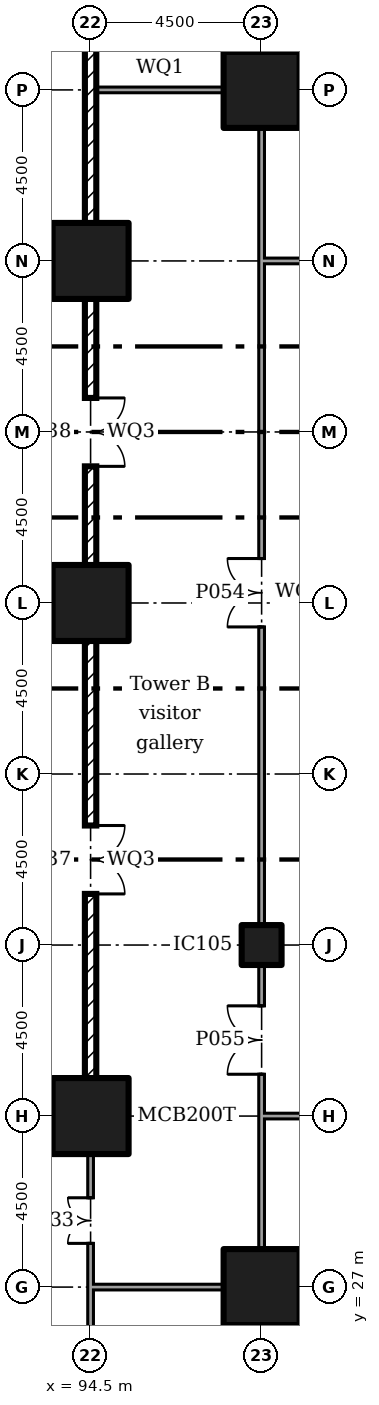
"""IFC4 building model, lengths in metres.
Left out: names, types, materials, properties, quantities, classifications, styles, units other than length and angle.
Written with IfcOpenShell. Run it as: python <this file> out.ifc"""

import sys

from ifc_helpers import new_model, si_unit, direction, frame, frame_2d, origin, origin_2d, place, context, subcontext, project, spatial, rectangle, extrude, element, fill, save


model = new_model("IFC4")
c1 = context("Model", 3, precision=1e-05, world=origin(), true_north=direction((0.0, 1.0)))
c2 = subcontext(c1, "Body", "Model", "MODEL_VIEW")
j1 = project(units=[si_unit("LENGTHUNIT", "METRE"), si_unit("PLANEANGLEUNIT", "RADIAN")], contexts=[c1])
p1 = place(None, origin())
s1 = spatial("IfcSite", under=j1, at=p1, CompositionType="ELEMENT")
p2 = place(p1, origin())
s2 = spatial("IfcBuilding", under=s1, at=p2, CompositionType="ELEMENT")
p3 = place(p2, frame((0.0, 0.0, 6.0)))
s3 = spatial("IfcBuildingStorey", under=s2, at=p3, CompositionType="ELEMENT", Elevation=6.0)
for number, where in (
    (1, (94.5, 31.5, 0.0)),
    (2, (94.5, 45.0, 0.0)),
    (3, (94.5, 54.0, 0.0)),
    (4, (99.0, 27.0, 0.0)),
    (5, (99.0, 58.5, 0.0)),
):
    element("IfcColumn", number, at=place(p3, frame(where)), inside=s3, PredefinedType="COLUMN", context=c2, shape_type="SweptSolid", body=[
        extrude(rectangle(XDim=2.0, YDim=2.0, at=origin_2d()), origin(), (0.0, 0.0, 1.0), 5.5),
    ])
p4 = place(p3, frame((99.0, 36.0, 0.0)))
e6 = element("IfcColumn", 6, at=p4, inside=s3, PredefinedType="COLUMN", context=c2, shape_type="SweptSolid", body=[
    extrude(rectangle(XDim=1.05, YDim=1.05, at=origin_2d()), origin(), (0.0, 0.0, 1.0), 5.5),
])
p5 = place(p3, frame((81.6, 31.5, 0.0)))
e7 = element("IfcWall", 7, at=p5, inside=s3, PredefinedType="SOLIDWALL", context=c2, shape_type="SweptSolid", body=[
    extrude(rectangle(XDim=11.905, YDim=0.3, at=frame_2d((5.952, 0.0))), origin(), (0.0, 0.0, 1.0), 5.5),
])
p6 = place(p5, frame((5.1, 0.0, 0.0)))
e8 = element("IfcOpeningElement", 8, at=p6, cuts=e7, PredefinedType="OPENING", context=c2, shape_type="SweptSolid", body=[
    extrude(rectangle(XDim=1.8, YDim=2.1, at=frame_2d((0.9, 1.05))), frame((0.0, 0.16, 0.0), z_axis=(0.0, -1.0, 0.0), x_axis=(1.0, 0.0, 0.0)), (0.0, 0.0, 1.0), 0.32),
])
p7 = place(p3, frame((94.5, 26.925, 0.0), z_axis=(0.0, 0.0, 1.0), x_axis=(0.0, 1.0, 0.0)))
e9 = element("IfcWall", 9, at=p7, inside=s3, PredefinedType="PARTITIONING", context=c2, shape_type="SweptSolid", body=[
    extrude(rectangle(XDim=3.58, YDim=0.15, at=frame_2d((1.79, 0.0))), origin(), (0.0, 0.0, 1.0), 5.05),
])
p8 = place(p7, frame((1.225, 0.0, 0.0)))
e10 = element("IfcOpeningElement", 10, at=p8, cuts=e9, PredefinedType="OPENING", context=c2, shape_type="SweptSolid", body=[
    extrude(rectangle(XDim=1.2, YDim=2.1, at=frame_2d((0.6, 1.05))), frame((0.0, 0.085, 0.0), z_axis=(0.0, -1.0, 0.0), x_axis=(1.0, 0.0, 0.0)), (0.0, 0.0, 1.0), 0.17),
])
p9 = place(p3, frame((94.5, 22.5, 0.0), z_axis=(0.0, 0.0, 1.0), x_axis=(0.0, 1.0, 0.0)))
e11 = element("IfcWall", 11, at=p9, inside=s3, PredefinedType="PARTITIONING", context=c2, shape_type="SweptSolid", body=[
    extrude(rectangle(XDim=4.5, YDim=0.15, at=frame_2d((2.25, 0.0))), origin(), (0.0, 0.0, 1.0), 5.05),
])
p10 = place(p3, frame((94.5, 32.495, 0.0), z_axis=(0.0, 0.0, 1.0), x_axis=(0.0, 1.0, 0.0)))
e12 = element("IfcWall", 12, at=p10, inside=s3, PredefinedType="SOLIDWALL", context=c2, shape_type="SweptSolid", body=[
    extrude(rectangle(XDim=11.51, YDim=0.3, at=frame_2d((5.755, 0.0))), origin(), (0.0, 0.0, 1.0), 10.05),
])
p11 = place(p10, frame((4.85, 0.0, 0.0)))
e13 = element("IfcOpeningElement", 13, at=p11, cuts=e12, PredefinedType="OPENING", context=c2, shape_type="SweptSolid", body=[
    extrude(rectangle(XDim=1.8, YDim=2.1, at=frame_2d((0.9, 1.05))), frame((0.0, 0.16, 0.0), z_axis=(0.0, -1.0, 0.0), x_axis=(1.0, 0.0, 0.0)), (0.0, 0.0, 1.0), 0.32),
])
p12 = place(p3, frame((94.5, 45.995, 0.0), z_axis=(0.0, 0.0, 1.0), x_axis=(0.0, 1.0, 0.0)))
e14 = element("IfcWall", 14, at=p12, inside=s3, PredefinedType="SOLIDWALL", context=c2, shape_type="SweptSolid", body=[
    extrude(rectangle(XDim=7.01, YDim=0.3, at=frame_2d((3.505, 0.0))), origin(), (0.0, 0.0, 1.0), 10.05),
])
p13 = place(p12, frame((2.6, 0.0, 0.0)))
e15 = element("IfcOpeningElement", 15, at=p13, cuts=e14, PredefinedType="OPENING", context=c2, shape_type="SweptSolid", body=[
    extrude(rectangle(XDim=1.8, YDim=2.1, at=frame_2d((0.9, 1.05))), frame((0.0, 0.16, 0.0), z_axis=(0.0, -1.0, 0.0), x_axis=(1.0, 0.0, 0.0)), (0.0, 0.0, 1.0), 0.32),
])
p14 = place(p3, frame((94.5, 54.995, 0.0), z_axis=(0.0, 0.0, 1.0), x_axis=(0.0, 1.0, 0.0)))
e16 = element("IfcWall", 16, at=p14, inside=s3, PredefinedType="SOLIDWALL", context=c2, shape_type="SweptSolid", body=[
    extrude(rectangle(XDim=3.58, YDim=0.3, at=frame_2d((1.79, 0.0))), origin(), (0.0, 0.0, 1.0), 10.05),
])
p15 = place(p3, frame((94.5, 58.425, 0.0), z_axis=(0.0, 0.0, 1.0), x_axis=(0.0, 1.0, 0.0)))
e17 = element("IfcWall", 17, at=p15, inside=s3, PredefinedType="SOLIDWALL", context=c2, shape_type="SweptSolid", body=[
    extrude(rectangle(XDim=8.925, YDim=0.3, at=frame_2d((4.462, 0.0))), origin(), (0.0, 0.0, 1.0), 10.05),
])
p16 = place(p3, frame((99.0, 31.425, 0.0), z_axis=(0.0, 0.0, 1.0), x_axis=(0.0, 1.0, 0.0)))
e18 = element("IfcWall", 18, at=p16, inside=s3, PredefinedType="PARTITIONING", context=c2, shape_type="SweptSolid", body=[
    extrude(rectangle(XDim=4.055, YDim=0.15, at=frame_2d((2.027, 0.0))), origin(), (0.0, 0.0, 1.0), 5.05),
])
p17 = place(p16, frame((1.175, 0.0, 0.0)))
e19 = element("IfcOpeningElement", 19, at=p17, cuts=e18, PredefinedType="OPENING", context=c2, shape_type="SweptSolid", body=[
    extrude(rectangle(XDim=1.8, YDim=2.1, at=frame_2d((0.9, 1.05))), frame((0.0, 0.085, 0.0), z_axis=(0.0, -1.0, 0.0), x_axis=(1.0, 0.0, 0.0)), (0.0, 0.0, 1.0), 0.17),
])
p18 = place(p3, frame((99.0, 36.52, 0.0), z_axis=(0.0, 0.0, 1.0), x_axis=(0.0, 1.0, 0.0)))
e20 = element("IfcWall", 20, at=p18, inside=s3, PredefinedType="PARTITIONING", context=c2, shape_type="SweptSolid", body=[
    extrude(rectangle(XDim=17.555, YDim=0.15, at=frame_2d((8.777, 0.0))), origin(), (0.0, 0.0, 1.0), 5.05),
])
p19 = place(p18, frame((7.85, 0.0, 0.0)))
e21 = element("IfcOpeningElement", 21, at=p19, cuts=e20, PredefinedType="OPENING", context=c2, shape_type="SweptSolid", body=[
    extrude(rectangle(XDim=1.8, YDim=2.1, at=frame_2d((0.9, 1.05))), frame((0.0, 0.085, 0.0), z_axis=(0.0, -1.0, 0.0), x_axis=(1.0, 0.0, 0.0)), (0.0, 0.0, 1.0), 0.17),
])
for number, where, z_axis, x_axis in (
    (22, (99.0, 27.995, 0.0), (0.0, 0.0, 1.0), (0.0, 1.0, 0.0)),
    (23, (99.0, 54.0, 0.0), (0.0, 0.0, 1.0), (0.0, 1.0, 0.0)),
):
    element("IfcWall", number, at=place(p3, frame(where, z_axis=z_axis, x_axis=x_axis)), inside=s3, PredefinedType="PARTITIONING", context=c2, shape_type="SweptSolid", body=[
        extrude(rectangle(XDim=3.505, YDim=0.15, at=frame_2d((1.752, 0.0))), origin(), (0.0, 0.0, 1.0), 5.05),
    ])
p20 = place(p3, frame((94.575, 27.0, 0.0)))
e24 = element("IfcWall", 24, at=p20, inside=s3, PredefinedType="PARTITIONING", context=c2, shape_type="SweptSolid", body=[
    extrude(rectangle(XDim=3.43, YDim=0.15, at=frame_2d((1.715, 0.0))), origin(), (0.0, 0.0, 1.0), 5.05),
])
p21 = place(p3, frame((94.65, 58.5, 0.0)))
e25 = element("IfcWall", 25, at=p21, inside=s3, PredefinedType="PARTITIONING", context=c2, shape_type="SweptSolid", body=[
    extrude(rectangle(XDim=3.355, YDim=0.15, at=frame_2d((1.677, 0.0))), origin(), (0.0, 0.0, 1.0), 5.05),
])
p22 = place(p3, frame((99.075, 31.5, 0.0)))
e26 = element("IfcWall", 26, at=p22, inside=s3, PredefinedType="PARTITIONING", context=c2, shape_type="SweptSolid", body=[
    extrude(rectangle(XDim=17.405, YDim=0.15, at=frame_2d((8.703, 0.0))), origin(), (0.0, 0.0, 1.0), 5.05),
])
p23 = place(p22, frame((8.175, 0.0, 0.0)))
e27 = element("IfcOpeningElement", 27, at=p23, cuts=e26, PredefinedType="OPENING", context=c2, shape_type="SweptSolid", body=[
    extrude(rectangle(XDim=1.0, YDim=2.1, at=frame_2d((0.5, 1.05))), frame((0.0, 0.085, 0.0), z_axis=(0.0, -1.0, 0.0), x_axis=(1.0, 0.0, 0.0)), (0.0, 0.0, 1.0), 0.17),
])
p24 = place(p3, frame((99.075, 54.0, 0.0)))
e28 = element("IfcWall", 28, at=p24, inside=s3, PredefinedType="PARTITIONING", context=c2, shape_type="SweptSolid", body=[
    extrude(rectangle(XDim=3.905, YDim=0.15, at=frame_2d((1.953, 0.0))), origin(), (0.0, 0.0, 1.0), 5.05),
])
for number, where in (
    (29, (99.995, 27.0, 0.0)),
    (30, (99.995, 58.5, 0.0)),
):
    element("IfcWall", number, at=place(p3, frame(where)), inside=s3, PredefinedType="PARTITIONING", context=c2, shape_type="SweptSolid", body=[
        extrude(rectangle(XDim=11.51, YDim=0.15, at=frame_2d((5.755, 0.0))), origin(), (0.0, 0.0, 1.0), 5.05),
    ])
p25 = place(p8, origin())
e31 = element("IfcDoor", 31, at=p25, inside=s3, OperationType="DOUBLE_DOOR_SINGLE_SWING", PredefinedType="DOOR", context=c2, shape_type="SweptSolid", body=[
    extrude(rectangle(XDim=1.2, YDim=2.1, at=frame_2d((0.6, 1.05))), frame((0.0, 0.025, 0.0), z_axis=(0.0, -1.0, 0.0), x_axis=(1.0, 0.0, 0.0)), (0.0, 0.0, 1.0), 0.05),
])
fill(e10, e31)
p26 = place(p11, frame((1.8, 0.0, 0.0), x_axis=(-1.0, 0.0, 0.0)))
e32 = element("IfcDoor", 32, at=p26, inside=s3, OperationType="DOUBLE_DOOR_SINGLE_SWING", PredefinedType="DOOR", context=c2, shape_type="SweptSolid", body=[
    extrude(rectangle(XDim=1.8, YDim=2.1, at=frame_2d((0.9, 1.05))), frame((0.0, 0.025, 0.0), z_axis=(0.0, -1.0, 0.0), x_axis=(1.0, 0.0, 0.0)), (0.0, 0.0, 1.0), 0.05),
])
fill(e13, e32)
p27 = place(p13, frame((1.8, 0.0, 0.0), x_axis=(-1.0, 0.0, 0.0)))
e33 = element("IfcDoor", 33, at=p27, inside=s3, OperationType="DOUBLE_DOOR_SINGLE_SWING", PredefinedType="DOOR", context=c2, shape_type="SweptSolid", body=[
    extrude(rectangle(XDim=1.8, YDim=2.1, at=frame_2d((0.9, 1.05))), frame((0.0, 0.025, 0.0), z_axis=(0.0, -1.0, 0.0), x_axis=(1.0, 0.0, 0.0)), (0.0, 0.0, 1.0), 0.05),
])
fill(e15, e33)
p28 = place(p19, origin())
e34 = element("IfcDoor", 34, at=p28, inside=s3, OperationType="DOUBLE_DOOR_SINGLE_SWING", PredefinedType="DOOR", context=c2, shape_type="SweptSolid", body=[
    extrude(rectangle(XDim=1.8, YDim=2.1, at=frame_2d((0.9, 1.05))), frame((0.0, 0.025, 0.0), z_axis=(0.0, -1.0, 0.0), x_axis=(1.0, 0.0, 0.0)), (0.0, 0.0, 1.0), 0.05),
])
fill(e21, e34)
p29 = place(p17, origin())
e35 = element("IfcDoor", 35, at=p29, inside=s3, OperationType="DOUBLE_DOOR_SINGLE_SWING", PredefinedType="DOOR", context=c2, shape_type="SweptSolid", body=[
    extrude(rectangle(XDim=1.8, YDim=2.1, at=frame_2d((0.9, 1.05))), frame((0.0, 0.025, 0.0), z_axis=(0.0, -1.0, 0.0), x_axis=(1.0, 0.0, 0.0)), (0.0, 0.0, 1.0), 0.05),
])
fill(e19, e35)
save(model, sys.argv[1])
